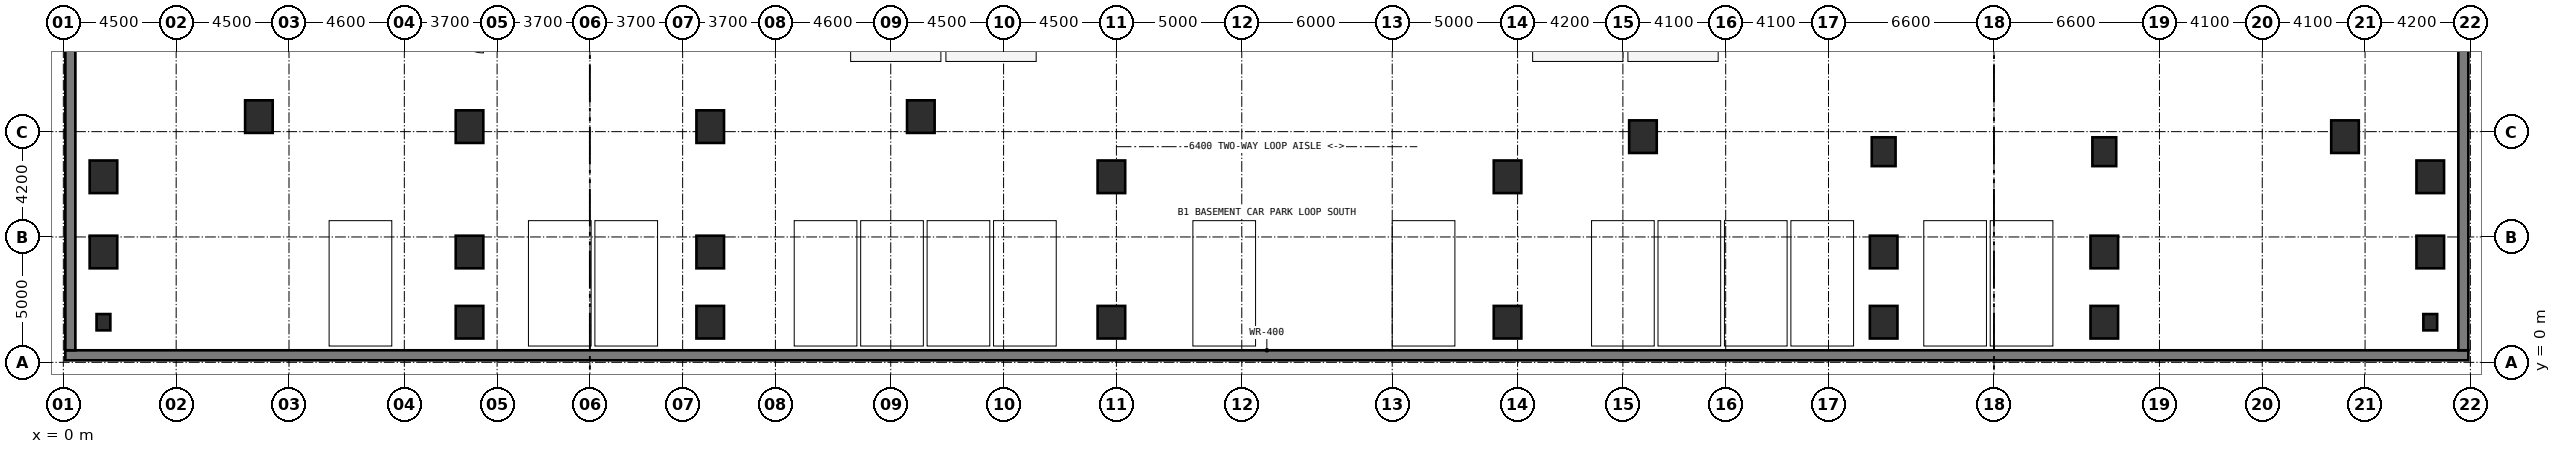
"""IFC4 building model, lengths in metres.
Left out: names, types, materials, properties, quantities, classifications, styles, units other than length and angle.
Written with IfcOpenShell. Run it as: python <this file> out.ifc"""

import sys

from ifc_helpers import new_model, si_unit, direction, frame, frame_2d, origin, origin_2d, place, context, subcontext, project, spatial, rectangle, extrude, element, save


model = new_model("IFC4")
c1 = context("Model", 3, precision=1e-05, world=origin(), true_north=direction((0.0, 1.0)))
c2 = subcontext(c1, "Body", "Model", "MODEL_VIEW")
j1 = project(units=[si_unit("LENGTHUNIT", "METRE"), si_unit("PLANEANGLEUNIT", "RADIAN")], contexts=[c1])
p1 = place(None, origin())
s1 = spatial("IfcSite", under=j1, at=p1, CompositionType="ELEMENT")
p2 = place(p1, origin())
s2 = spatial("IfcBuilding", under=s1, at=p2, CompositionType="ELEMENT")
p3 = place(p2, frame((0.0, 0.0, -4.2)))
s3 = spatial("IfcBuildingStorey", under=s2, at=p3, CompositionType="ELEMENT", Elevation=-4.2)
p4 = place(p3, frame((0.08, 0.28, 0.0), z_axis=(0.0, 0.0, 1.0), x_axis=(1.0, 0.0, 0.0)))
e1 = element("IfcWall", 1, at=p4, inside=s3, PredefinedType="USERDEFINED", context=c2, shape_type="SweptSolid", body=[
    extrude(rectangle(XDim=95.84, YDim=0.4, at=frame_2d((47.92, 0.0))), origin(), (0.0, 0.0, 1.0), 4.2),
])
for number, where, z_axis, x_axis in (
    (2, (0.28, 49.52, 0.0), (0.0, 0.0, 1.0), (0.0, -1.0, 0.0)),
    (3, (95.72, 0.48, 0.0), (0.0, 0.0, 1.0), (0.0, 1.0, 0.0)),
):
    element("IfcWall", number, at=place(p3, frame(where, z_axis=z_axis, x_axis=x_axis)), inside=s3, PredefinedType="USERDEFINED", context=c2, shape_type="SweptSolid", body=[
        extrude(rectangle(XDim=49.04, YDim=0.4, at=frame_2d((24.52, 0.0))), origin(), (0.0, 0.0, 1.0), 4.2),
    ])
for number, where, z_axis, x_axis in (
    (4, (16.2, 9.4, 0.0), (0.0, 0.0, 1.0), (1.0, 0.0, 0.0)),
    (5, (25.8, 9.4, 0.0), (0.0, 0.0, 1.0), (1.0, 0.0, 0.0)),
    (6, (7.8, 9.8, 0.0), (0.0, 0.0, 1.0), (1.0, 0.0, 0.0)),
    (7, (34.2, 9.8, 0.0), (0.0, 0.0, 1.0), (1.0, 0.0, 0.0)),
):
    element("IfcColumn", number, at=place(p3, frame(where, z_axis=z_axis, x_axis=x_axis)), inside=s3, PredefinedType="COLUMN", context=c2, shape_type="SweptSolid", body=[
        extrude(rectangle(XDim=1.1, YDim=1.3, at=origin_2d()), origin(), (0.0, 0.0, 1.0), 4.2),
    ])
for number, where, z_axis, x_axis in (
    (8, (72.6, 8.4, 0.0), (0.0, 0.0, 1.0), (1.0, 0.0, 0.0)),
    (9, (81.4, 8.4, 0.0), (0.0, 0.0, 1.0), (1.0, 0.0, 0.0)),
):
    element("IfcColumn", number, at=place(p3, frame(where, z_axis=z_axis, x_axis=x_axis)), inside=s3, PredefinedType="COLUMN", context=c2, shape_type="SweptSolid", body=[
        extrude(rectangle(XDim=0.95, YDim=1.15, at=origin_2d()), origin(), (0.0, 0.0, 1.0), 4.2),
    ])
for number, where, z_axis, x_axis in (
    (10, (63.0, 9.0, 0.0), (0.0, 0.0, 1.0), (1.0, 0.0, 0.0)),
    (11, (91.0, 9.0, 0.0), (0.0, 0.0, 1.0), (1.0, 0.0, 0.0)),
):
    element("IfcColumn", number, at=place(p3, frame(where, z_axis=z_axis, x_axis=x_axis)), inside=s3, PredefinedType="COLUMN", context=c2, shape_type="SweptSolid", body=[
        extrude(rectangle(XDim=1.1, YDim=1.3, at=origin_2d()), origin(), (0.0, 0.0, 1.0), 4.2),
    ])
p5 = place(p3, frame((1.6, 1.6, 0.0), z_axis=(0.0, 0.0, 1.0), x_axis=(1.0, 0.0, 0.0)))
e12 = element("IfcColumn", 12, at=p5, inside=s3, PredefinedType="PILASTER", context=c2, shape_type="SweptSolid", body=[
    extrude(rectangle(XDim=0.55, YDim=0.65, at=origin_2d()), origin(), (0.0, 0.0, 1.0), 4.2),
])
for number, where, z_axis, x_axis in (
    (13, (16.2, 1.6, 0.0), (0.0, 0.0, 1.0), (1.0, 0.0, 0.0)),
    (14, (25.8, 1.6, 0.0), (0.0, 0.0, 1.0), (1.0, 0.0, 0.0)),
    (15, (41.8, 1.6, 0.0), (0.0, 0.0, 1.0), (1.0, 0.0, 0.0)),
    (16, (57.6, 1.6, 0.0), (0.0, 0.0, 1.0), (1.0, 0.0, 0.0)),
    (17, (72.6, 1.6, 0.0), (0.0, 0.0, 1.0), (1.0, 0.0, 0.0)),
    (18, (81.4, 1.6, 0.0), (0.0, 0.0, 1.0), (1.0, 0.0, 0.0)),
):
    element("IfcColumn", number, at=place(p3, frame(where, z_axis=z_axis, x_axis=x_axis)), inside=s3, PredefinedType="COLUMN", context=c2, shape_type="SweptSolid", body=[
        extrude(rectangle(XDim=1.1, YDim=1.3, at=origin_2d()), origin(), (0.0, 0.0, 1.0), 4.2),
    ])
p6 = place(p3, frame((94.4, 1.6, 0.0), z_axis=(0.0, 0.0, 1.0), x_axis=(1.0, 0.0, 0.0)))
e19 = element("IfcColumn", 19, at=p6, inside=s3, PredefinedType="PILASTER", context=c2, shape_type="SweptSolid", body=[
    extrude(rectangle(XDim=0.55, YDim=0.65, at=origin_2d()), origin(), (0.0, 0.0, 1.0), 4.2),
])
for number, where, z_axis, x_axis in (
    (20, (1.6, 4.4, 0.0), (0.0, 0.0, 1.0), (1.0, 0.0, 0.0)),
    (21, (16.2, 4.4, 0.0), (0.0, 0.0, 1.0), (1.0, 0.0, 0.0)),
    (22, (25.8, 4.4, 0.0), (0.0, 0.0, 1.0), (1.0, 0.0, 0.0)),
    (23, (72.6, 4.4, 0.0), (0.0, 0.0, 1.0), (1.0, 0.0, 0.0)),
    (24, (81.4, 4.4, 0.0), (0.0, 0.0, 1.0), (1.0, 0.0, 0.0)),
    (25, (94.4, 4.4, 0.0), (0.0, 0.0, 1.0), (1.0, 0.0, 0.0)),
    (26, (1.6, 7.4, 0.0), (0.0, 0.0, 1.0), (1.0, 0.0, 0.0)),
    (27, (41.8, 7.4, 0.0), (0.0, 0.0, 1.0), (1.0, 0.0, 0.0)),
    (28, (57.6, 7.4, 0.0), (0.0, 0.0, 1.0), (1.0, 0.0, 0.0)),
    (29, (94.4, 7.4, 0.0), (0.0, 0.0, 1.0), (1.0, 0.0, 0.0)),
):
    element("IfcColumn", number, at=place(p3, frame(where, z_axis=z_axis, x_axis=x_axis)), inside=s3, PredefinedType="COLUMN", context=c2, shape_type="SweptSolid", body=[
        extrude(rectangle(XDim=1.1, YDim=1.3, at=origin_2d()), origin(), (0.0, 0.0, 1.0), 4.2),
    ])
save(model, sys.argv[1])
